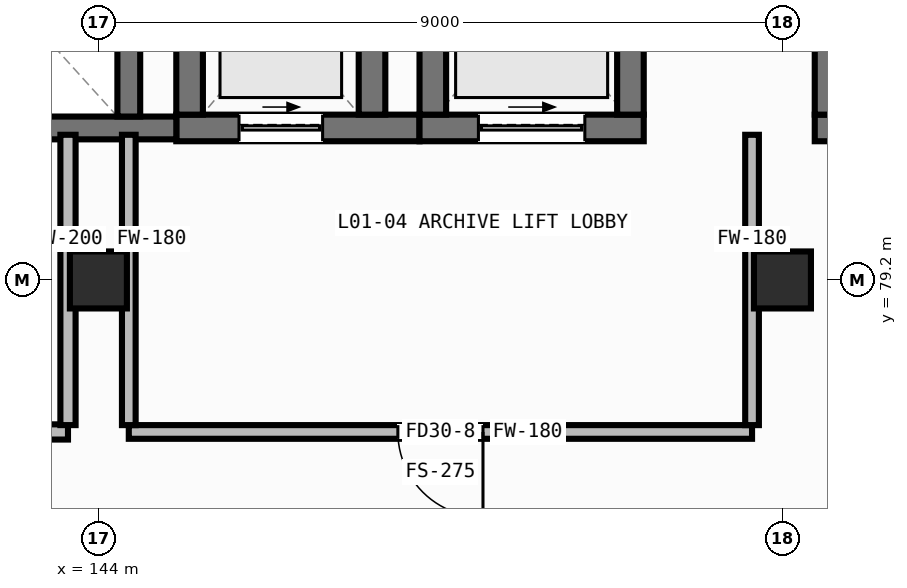
"""IFC4 building model, lengths in metres.
Left out: names, types, materials, properties, quantities, classifications, styles, units other than length and angle.
Written with IfcOpenShell. Run it as: python <this file> out.ifc"""

import sys

from ifc_helpers import new_model, si_unit, direction, frame, frame_2d, origin, origin_2d, place, context, subcontext, project, spatial, rectangle, hollow_rectangle, extrude, element, fill, save


model = new_model("IFC4")
c1 = context("Model", 3, precision=1e-05, world=origin(), true_north=direction((0.0, 1.0)))
c2 = subcontext(c1, "Body", "Model", "MODEL_VIEW")
j1 = project(units=[si_unit("LENGTHUNIT", "METRE"), si_unit("PLANEANGLEUNIT", "RADIAN")], contexts=[c1])
p1 = place(None, origin())
s1 = spatial("IfcSite", under=j1, at=p1, CompositionType="ELEMENT")
p2 = place(p1, origin())
s2 = spatial("IfcBuilding", under=s1, at=p2, CompositionType="ELEMENT")
p3 = place(p2, origin())
s3 = spatial("IfcBuildingStorey", under=s2, at=p3, CompositionType="ELEMENT", Elevation=0.0)
for number, where, z_axis, x_axis in (
    (1, (144.0, 79.2, 0.0), (0.0, 0.0, 1.0), (1.0, 0.0, 0.0)),
    (2, (153.0, 79.2, 0.0), (0.0, 0.0, 1.0), (1.0, 0.0, 0.0)),
):
    element("IfcColumn", number, at=place(p3, frame(where, z_axis=z_axis, x_axis=x_axis)), inside=s3, PredefinedType="COLUMN", context=c2, shape_type="SweptSolid", body=[
        extrude(hollow_rectangle(XDim=0.75, YDim=0.75, WallThickness=0.032, at=origin_2d()), origin(), (0.0, 0.0, 1.0), 4.8),
    ])
p4 = place(p3, frame((153.425, 81.2, 0.0), z_axis=(0.0, 0.0, 1.0), x_axis=(1.0, 0.0, 0.0)))
e3 = element("IfcWall", 3, at=p4, inside=s3, PredefinedType="SHEAR", context=c2, shape_type="SweptSolid", body=[
    extrude(rectangle(XDim=8.15, YDim=0.35, at=frame_2d((4.075, 0.0))), origin(), (0.0, 0.0, 1.0), 4.555),
])
p5 = place(p4, frame((0.525, 0.0, 0.0)))
e4 = element("IfcOpeningElement", 4, at=p5, cuts=e3, PredefinedType="OPENING", context=c2, shape_type="SweptSolid", body=[
    extrude(rectangle(XDim=1.15, YDim=2.1, at=frame_2d((0.575, 1.05))), frame((0.0, 0.187, 0.0), z_axis=(0.0, -1.0, 0.0), x_axis=(1.0, 0.0, 0.0)), (0.0, 0.0, 1.0), 0.374),
])
p6 = place(p3, frame((153.6, 81.375, 0.0), z_axis=(0.0, 0.0, 1.0), x_axis=(0.0, 1.0, 0.0)))
e5 = element("IfcWall", 5, at=p6, inside=s3, PredefinedType="SHEAR", context=c2, shape_type="SweptSolid", body=[
    extrude(rectangle(XDim=3.55, YDim=0.35, at=frame_2d((1.775, 0.0))), origin(), (0.0, 0.0, 1.0), 4.555),
])
p7 = place(p3, frame((145.025, 81.2, 0.0), z_axis=(0.0, 0.0, 1.0), x_axis=(1.0, 0.0, 0.0)))
e6 = element("IfcWall", 6, at=p7, inside=s3, PredefinedType="SHEAR", context=c2, shape_type="SweptSolid", body=[
    extrude(rectangle(XDim=3.2, YDim=0.35, at=frame_2d((1.6, 0.0))), origin(), (0.0, 0.0, 1.0), 4.555),
])
p8 = place(p7, frame((0.825, 0.0, 0.0)))
e7 = element("IfcOpeningElement", 7, at=p8, cuts=e6, PredefinedType="OPENING", context=c2, shape_type="SweptSolid", body=[
    extrude(rectangle(XDim=1.1, YDim=2.1, at=frame_2d((0.55, 1.05))), frame((0.0, 0.187, 0.0), z_axis=(0.0, -1.0, 0.0), x_axis=(1.0, 0.0, 0.0)), (0.0, 0.0, 1.0), 0.374),
])
for number, where, z_axis, x_axis in (
    (8, (145.2, 81.375, 0.0), (0.0, 0.0, 1.0), (0.0, 1.0, 0.0)),
    (9, (147.6, 81.375, 0.0), (0.0, 0.0, 1.0), (0.0, 1.0, 0.0)),
):
    element("IfcWall", number, at=place(p3, frame(where, z_axis=z_axis, x_axis=x_axis)), inside=s3, PredefinedType="SHEAR", context=c2, shape_type="SweptSolid", body=[
        extrude(rectangle(XDim=2.45, YDim=0.35, at=frame_2d((1.225, 0.0))), origin(), (0.0, 0.0, 1.0), 4.555),
    ])
p9 = place(p3, frame((148.225, 81.2, 0.0), z_axis=(0.0, 0.0, 1.0), x_axis=(1.0, 0.0, 0.0)))
e10 = element("IfcWall", 10, at=p9, inside=s3, PredefinedType="SHEAR", context=c2, shape_type="SweptSolid", body=[
    extrude(rectangle(XDim=2.95, YDim=0.35, at=frame_2d((1.475, 0.0))), origin(), (0.0, 0.0, 1.0), 4.555),
])
p10 = place(p9, frame((0.775, 0.0, 0.0)))
e11 = element("IfcOpeningElement", 11, at=p10, cuts=e10, PredefinedType="OPENING", context=c2, shape_type="SweptSolid", body=[
    extrude(rectangle(XDim=1.4, YDim=2.15, at=frame_2d((0.7, 1.075))), frame((0.0, 0.187, 0.0), z_axis=(0.0, -1.0, 0.0), x_axis=(1.0, 0.0, 0.0)), (0.0, 0.0, 1.0), 0.374),
])
for number, where, z_axis, x_axis in (
    (12, (148.4, 81.375, 0.0), (0.0, 0.0, 1.0), (0.0, 1.0, 0.0)),
    (13, (151.0, 81.375, 0.0), (0.0, 0.0, 1.0), (0.0, 1.0, 0.0)),
):
    element("IfcWall", number, at=place(p3, frame(where, z_axis=z_axis, x_axis=x_axis)), inside=s3, PredefinedType="SHEAR", context=c2, shape_type="SweptSolid", body=[
        extrude(rectangle(XDim=3.05, YDim=0.35, at=frame_2d((1.525, 0.0))), origin(), (0.0, 0.0, 1.0), 4.555),
    ])
p11 = place(p3, frame((141.775, 81.2, 0.0), z_axis=(0.0, 0.0, 1.0), x_axis=(1.0, 0.0, 0.0)))
e14 = element("IfcWall", 14, at=p11, inside=s3, PredefinedType="SHEAR", context=c2, shape_type="SweptSolid", body=[
    extrude(rectangle(XDim=3.25, YDim=0.3, at=frame_2d((1.625, 0.0))), origin(), (0.0, 0.0, 1.0), 4.555),
])
p12 = place(p3, frame((144.4, 81.35, 0.0), z_axis=(0.0, 0.0, 1.0), x_axis=(0.0, 1.0, 0.0)))
e15 = element("IfcWall", 15, at=p12, inside=s3, PredefinedType="SHEAR", context=c2, shape_type="SweptSolid", body=[
    extrude(rectangle(XDim=2.1, YDim=0.3, at=frame_2d((1.05, 0.0))), origin(), (0.0, 0.0, 1.0), 4.555),
])
p13 = place(p3, frame((135.8, 77.2, 0.0), z_axis=(0.0, 0.0, 1.0), x_axis=(1.0, 0.0, 0.0)))
e16 = element("IfcWall", 16, at=p13, inside=s3, PredefinedType="PARTITIONING", context=c2, shape_type="SweptSolid", body=[
    extrude(rectangle(XDim=7.8, YDim=0.2, at=frame_2d((3.9, 0.0))), origin(), (0.0, 0.0, 1.0), 4.555),
])
p14 = place(p13, frame((3.1, 0.0, 0.0)))
e17 = element("IfcOpeningElement", 17, at=p14, cuts=e16, PredefinedType="OPENING", context=c2, shape_type="SweptSolid", body=[
    extrude(rectangle(XDim=1.2, YDim=2.1, at=frame_2d((0.6, 1.05))), frame((0.0, 0.112, 0.0), z_axis=(0.0, -1.0, 0.0), x_axis=(1.0, 0.0, 0.0)), (0.0, 0.0, 1.0), 0.224),
])
p15 = place(p3, frame((143.6, 77.29, 0.0), z_axis=(0.0, 0.0, 1.0), x_axis=(0.0, 1.0, 0.0)))
e18 = element("IfcWall", 18, at=p15, inside=s3, PredefinedType="PARTITIONING", context=c2, shape_type="SweptSolid", body=[
    extrude(rectangle(XDim=3.82, YDim=0.2, at=frame_2d((1.91, 0.0))), origin(), (0.0, 0.0, 1.0), 4.555),
])
p16 = place(p3, frame((144.4, 77.2, 0.0), z_axis=(0.0, 0.0, 1.0), x_axis=(1.0, 0.0, 0.0)))
e19 = element("IfcWall", 19, at=p16, inside=s3, PredefinedType="PARTITIONING", context=c2, shape_type="SweptSolid", body=[
    extrude(rectangle(XDim=8.2, YDim=0.18, at=frame_2d((4.1, 0.0))), origin(), (0.0, 0.0, 1.0), 4.555),
])
p17 = place(p16, frame((3.54, 0.0, 0.0)))
e20 = element("IfcOpeningElement", 20, at=p17, cuts=e19, PredefinedType="OPENING", context=c2, shape_type="SweptSolid", body=[
    extrude(rectangle(XDim=1.12, YDim=2.08, at=frame_2d((0.56, 1.04))), frame((0.0, 0.102, 0.0), z_axis=(0.0, -1.0, 0.0), x_axis=(1.0, 0.0, 0.0)), (0.0, 0.0, 1.0), 0.204),
])
for number, where, z_axis, x_axis in (
    (21, (144.4, 77.29, 0.0), (0.0, 0.0, 1.0), (0.0, 1.0, 0.0)),
    (22, (152.6, 77.29, 0.0), (0.0, 0.0, 1.0), (0.0, 1.0, 0.0)),
):
    element("IfcWall", number, at=place(p3, frame(where, z_axis=z_axis, x_axis=x_axis)), inside=s3, PredefinedType="PARTITIONING", context=c2, shape_type="SweptSolid", body=[
        extrude(rectangle(XDim=3.82, YDim=0.18, at=frame_2d((1.91, 0.0))), origin(), (0.0, 0.0, 1.0), 4.555),
    ])
p18 = place(p8, origin())
e23 = element("IfcDoor", 23, at=p18, inside=s3, OperationType="SLIDING_TO_LEFT", PredefinedType="DOOR", context=c2, shape_type="SweptSolid", body=[
    extrude(rectangle(XDim=1.1, YDim=2.1, at=frame_2d((0.55, 1.05))), frame((0.0, 0.025, 0.0), z_axis=(0.0, -1.0, 0.0), x_axis=(1.0, 0.0, 0.0)), (0.0, 0.0, 1.0), 0.05),
])
fill(e7, e23)
p19 = place(p10, origin())
e24 = element("IfcDoor", 24, at=p19, inside=s3, OperationType="SLIDING_TO_LEFT", PredefinedType="DOOR", context=c2, shape_type="SweptSolid", body=[
    extrude(rectangle(XDim=1.4, YDim=2.15, at=frame_2d((0.7, 1.075))), frame((0.0, 0.025, 0.0), z_axis=(0.0, -1.0, 0.0), x_axis=(1.0, 0.0, 0.0)), (0.0, 0.0, 1.0), 0.05),
])
fill(e11, e24)
p20 = place(p17, frame((1.12, 0.0, 0.0), z_axis=(0.0, 0.0, 1.0), x_axis=(-1.0, 0.0, 0.0)))
e25 = element("IfcDoor", 25, at=p20, inside=s3, OperationType="SINGLE_SWING_LEFT", PredefinedType="DOOR", context=c2, shape_type="SweptSolid", body=[
    extrude(rectangle(XDim=1.12, YDim=2.08, at=frame_2d((0.56, 1.04))), frame((0.0, 0.025, 0.0), z_axis=(0.0, -1.0, 0.0), x_axis=(1.0, 0.0, 0.0)), (0.0, 0.0, 1.0), 0.05),
])
fill(e20, e25)
save(model, sys.argv[1])
